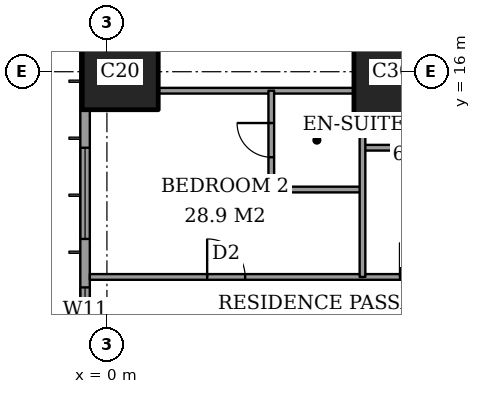
"""IFC4 building model, lengths in metres.
Left out: names, types, materials, properties, quantities, classifications, styles, units other than length and angle.
Written with IfcOpenShell. Run it as: python <this file> out.ifc"""

import sys

from ifc_helpers import new_model, si_unit, direction, frame, frame_2d, origin, origin_2d, place, context, subcontext, project, spatial, rectangle, extrude, element, fill, save


model = new_model("IFC4")
c1 = context("Model", 3, precision=1e-05, world=origin(), true_north=direction((0.0, 1.0)))
c2 = subcontext(c1, "Body", "Model", "MODEL_VIEW")
j1 = project(units=[si_unit("LENGTHUNIT", "METRE"), si_unit("PLANEANGLEUNIT", "RADIAN")], contexts=[c1])
p1 = place(None, origin())
s1 = spatial("IfcSite", under=j1, at=p1, CompositionType="ELEMENT")
p2 = place(p1, origin())
s2 = spatial("IfcBuilding", under=s1, at=p2, CompositionType="ELEMENT")
p3 = place(p2, frame((0.0, 0.0, 164.6)))
s3 = spatial("IfcBuildingStorey", under=s2, at=p3, CompositionType="ELEMENT", Elevation=164.6)
p4 = place(p3, frame((0.35, 16.0, 0.0), z_axis=(0.0, 0.0, 1.0), x_axis=(1.0, 0.0, 0.0)))
e1 = element("IfcColumn", 1, at=p4, inside=s3, PredefinedType="COLUMN", context=c2, shape_type="SweptSolid", body=[
    extrude(rectangle(XDim=2.0, YDim=2.0, at=origin_2d()), origin(), (0.0, 0.0, 1.0), 3.6),
])
p5 = place(p3, frame((8.0, 16.0, 0.0), z_axis=(0.0, 0.0, 1.0), x_axis=(1.0, 0.0, 0.0)))
e2 = element("IfcColumn", 2, at=p5, inside=s3, PredefinedType="COLUMN", context=c2, shape_type="SweptSolid", body=[
    extrude(rectangle(XDim=3.0, YDim=2.4, at=origin_2d()), origin(), (0.0, 0.0, 1.0), 3.6),
])
p6 = place(p3, frame((-0.575, 44.825, 0.0), z_axis=(0.0, 0.0, 1.0), x_axis=(0.0, -1.0, 0.0)))
e3 = element("IfcWall", 3, at=p6, inside=s3, PredefinedType="SOLIDWALL", context=c2, shape_type="SweptSolid", body=[
    extrude(rectangle(XDim=41.65, YDim=0.25, at=frame_2d((20.825, 0.0))), origin(), (0.0, 0.0, 1.0), 3.6),
])
p7 = place(p6, frame((0.775, 0.0, 0.4)))
e4 = element("IfcOpeningElement", 4, at=p7, cuts=e3, PredefinedType="OPENING", context=c2, shape_type="SweptSolid", body=[
    extrude(rectangle(XDim=2.4, YDim=2.2, at=frame_2d((1.2, 1.1))), frame((0.0, 0.135, 0.0), z_axis=(0.0, -1.0, 0.0), x_axis=(1.0, 0.0, 0.0)), (0.0, 0.0, 1.0), 0.27),
])
p8 = place(p6, frame((6.1, 0.0, 0.4)))
e5 = element("IfcOpeningElement", 5, at=p8, cuts=e3, PredefinedType="OPENING", context=c2, shape_type="SweptSolid", body=[
    extrude(rectangle(XDim=1.2, YDim=2.2, at=frame_2d((0.6, 1.1))), frame((0.0, 0.135, 0.0), z_axis=(0.0, -1.0, 0.0), x_axis=(1.0, 0.0, 0.0)), (0.0, 0.0, 1.0), 0.27),
])
p9 = place(p6, frame((8.425, 0.0, 0.4)))
e6 = element("IfcOpeningElement", 6, at=p9, cuts=e3, PredefinedType="OPENING", context=c2, shape_type="SweptSolid", body=[
    extrude(rectangle(XDim=2.4, YDim=2.2, at=frame_2d((1.2, 1.1))), frame((0.0, 0.135, 0.0), z_axis=(0.0, -1.0, 0.0), x_axis=(1.0, 0.0, 0.0)), (0.0, 0.0, 1.0), 0.27),
])
p10 = place(p6, frame((15.625, 0.0, 0.4)))
e7 = element("IfcOpeningElement", 7, at=p10, cuts=e3, PredefinedType="OPENING", context=c2, shape_type="SweptSolid", body=[
    extrude(rectangle(XDim=2.4, YDim=2.2, at=frame_2d((1.2, 1.1))), frame((0.0, 0.135, 0.0), z_axis=(0.0, -1.0, 0.0), x_axis=(1.0, 0.0, 0.0)), (0.0, 0.0, 1.0), 0.27),
])
p11 = place(p6, frame((23.625, 0.0, 0.4)))
e8 = element("IfcOpeningElement", 8, at=p11, cuts=e3, PredefinedType="OPENING", context=c2, shape_type="SweptSolid", body=[
    extrude(rectangle(XDim=2.4, YDim=2.2, at=frame_2d((1.2, 1.1))), frame((0.0, 0.135, 0.0), z_axis=(0.0, -1.0, 0.0), x_axis=(1.0, 0.0, 0.0)), (0.0, 0.0, 1.0), 0.27),
])
p12 = place(p6, frame((30.825, 0.0, 0.4)))
e9 = element("IfcOpeningElement", 9, at=p12, cuts=e3, PredefinedType="OPENING", context=c2, shape_type="SweptSolid", body=[
    extrude(rectangle(XDim=2.4, YDim=2.2, at=frame_2d((1.2, 1.1))), frame((0.0, 0.135, 0.0), z_axis=(0.0, -1.0, 0.0), x_axis=(1.0, 0.0, 0.0)), (0.0, 0.0, 1.0), 0.27),
])
p13 = place(p6, frame((34.5, 0.0, 0.4)))
e10 = element("IfcOpeningElement", 10, at=p13, cuts=e3, PredefinedType="OPENING", context=c2, shape_type="SweptSolid", body=[
    extrude(rectangle(XDim=1.2, YDim=2.2, at=frame_2d((0.6, 1.1))), frame((0.0, 0.135, 0.0), z_axis=(0.0, -1.0, 0.0), x_axis=(1.0, 0.0, 0.0)), (0.0, 0.0, 1.0), 0.27),
])
p14 = place(p6, frame((38.475, 0.0, 0.4)))
e11 = element("IfcOpeningElement", 11, at=p14, cuts=e3, PredefinedType="OPENING", context=c2, shape_type="SweptSolid", body=[
    extrude(rectangle(XDim=2.4, YDim=2.2, at=frame_2d((1.2, 1.1))), frame((0.0, 0.135, 0.0), z_axis=(0.0, -1.0, 0.0), x_axis=(1.0, 0.0, 0.0)), (0.0, 0.0, 1.0), 0.27),
])
p15 = place(p3, frame((-0.45, 10.6, 0.0), z_axis=(0.0, 0.0, 1.0), x_axis=(1.0, 0.0, 0.0)))
e12 = element("IfcWall", 12, at=p15, inside=s3, PredefinedType="PARTITIONING", context=c2, shape_type="SweptSolid", body=[
    extrude(rectangle(XDim=25.011, YDim=0.15, at=frame_2d((12.505, 0.0))), origin(), (0.0, 0.0, 1.0), 3.35),
])
p16 = place(p15, frame((10.65, 0.0, 0.0)))
e13 = element("IfcOpeningElement", 13, at=p16, cuts=e12, PredefinedType="OPENING", context=c2, shape_type="SweptSolid", body=[
    extrude(rectangle(XDim=1.0, YDim=2.1, at=frame_2d((0.5, 1.05))), frame((0.0, 0.085, 0.0), z_axis=(0.0, -1.0, 0.0), x_axis=(1.0, 0.0, 0.0)), (0.0, 0.0, 1.0), 0.17),
])
p17 = place(p15, frame((3.087, 0.0, 0.0)))
e14 = element("IfcOpeningElement", 14, at=p17, cuts=e12, PredefinedType="OPENING", context=c2, shape_type="SweptSolid", body=[
    extrude(rectangle(XDim=1.0, YDim=2.1, at=frame_2d((0.5, 1.05))), frame((0.0, 0.085, 0.0), z_axis=(0.0, -1.0, 0.0), x_axis=(1.0, 0.0, 0.0)), (0.0, 0.0, 1.0), 0.17),
])
p18 = place(p15, frame((8.163, 0.0, 0.0)))
e15 = element("IfcOpeningElement", 15, at=p18, cuts=e12, PredefinedType="OPENING", context=c2, shape_type="SweptSolid", body=[
    extrude(rectangle(XDim=0.9, YDim=2.1, at=frame_2d((0.45, 1.05))), frame((0.0, 0.085, 0.0), z_axis=(0.0, -1.0, 0.0), x_axis=(1.0, 0.0, 0.0)), (0.0, 0.0, 1.0), 0.17),
])
p19 = place(p15, frame((13.35, 0.0, 0.0)))
e16 = element("IfcOpeningElement", 16, at=p19, cuts=e12, PredefinedType="OPENING", context=c2, shape_type="SweptSolid", body=[
    extrude(rectangle(XDim=1.0, YDim=2.1, at=frame_2d((0.5, 1.05))), frame((0.0, 0.085, 0.0), z_axis=(0.0, -1.0, 0.0), x_axis=(1.0, 0.0, 0.0)), (0.0, 0.0, 1.0), 0.17),
])
p20 = place(p15, frame((16.45, 0.0, 0.0)))
e17 = element("IfcOpeningElement", 17, at=p20, cuts=e12, PredefinedType="OPENING", context=c2, shape_type="SweptSolid", body=[
    extrude(rectangle(XDim=1.0, YDim=2.1, at=frame_2d((0.5, 1.05))), frame((0.0, 0.085, 0.0), z_axis=(0.0, -1.0, 0.0), x_axis=(1.0, 0.0, 0.0)), (0.0, 0.0, 1.0), 0.17),
])
p21 = place(p15, frame((21.175, 0.0, 0.0)))
e18 = element("IfcOpeningElement", 18, at=p21, cuts=e12, PredefinedType="OPENING", context=c2, shape_type="SweptSolid", body=[
    extrude(rectangle(XDim=1.0, YDim=2.1, at=frame_2d((0.5, 1.05))), frame((0.0, 0.085, 0.0), z_axis=(0.0, -1.0, 0.0), x_axis=(1.0, 0.0, 0.0)), (0.0, 0.0, 1.0), 0.17),
])
p22 = place(p3, frame((4.325, 12.9, 0.0), z_axis=(0.0, 0.0, 1.0), x_axis=(1.0, 0.0, 0.0)))
e19 = element("IfcWall", 19, at=p22, inside=s3, PredefinedType="PARTITIONING", context=c2, shape_type="SweptSolid", body=[
    extrude(rectangle(XDim=2.4, YDim=0.15, at=frame_2d((1.2, 0.0))), origin(), (0.0, 0.0, 1.0), 3.35),
])
p23 = place(p3, frame((6.725, 14.0, 0.0), z_axis=(0.0, 0.0, 1.0), x_axis=(1.0, 0.0, 0.0)))
e20 = element("IfcWall", 20, at=p23, inside=s3, PredefinedType="PARTITIONING", context=c2, shape_type="SweptSolid", body=[
    extrude(rectangle(XDim=2.875, YDim=0.15, at=frame_2d((1.438, 0.0))), origin(), (0.0, 0.0, 1.0), 3.35),
])
p24 = place(p3, frame((1.35, 15.5, 0.0), z_axis=(0.0, 0.0, 1.0), x_axis=(1.0, 0.0, 0.0)))
e21 = element("IfcWall", 21, at=p24, inside=s3, PredefinedType="PARTITIONING", context=c2, shape_type="SweptSolid", body=[
    extrude(rectangle(XDim=5.15, YDim=0.15, at=frame_2d((2.575, 0.0))), origin(), (0.0, 0.0, 1.0), 3.35),
])
p25 = place(p3, frame((4.325, 12.9, 0.0), z_axis=(0.0, 0.0, 1.0), x_axis=(0.0, 1.0, 0.0)))
e22 = element("IfcWall", 22, at=p25, inside=s3, PredefinedType="PARTITIONING", context=c2, shape_type="SweptSolid", body=[
    extrude(rectangle(XDim=2.6, YDim=0.15, at=frame_2d((1.3, 0.0))), origin(), (0.0, 0.0, 1.0), 3.35),
])
p26 = place(p25, frame((0.85, 0.0, 0.0)))
e23 = element("IfcOpeningElement", 23, at=p26, cuts=e22, PredefinedType="OPENING", context=c2, shape_type="SweptSolid", body=[
    extrude(rectangle(XDim=0.9, YDim=2.1, at=frame_2d((0.45, 1.05))), frame((0.0, 0.085, 0.0), z_axis=(0.0, -1.0, 0.0), x_axis=(1.0, 0.0, 0.0)), (0.0, 0.0, 1.0), 0.17),
])
p27 = place(p3, frame((6.725, 10.6, 0.0), z_axis=(0.0, 0.0, 1.0), x_axis=(0.0, 1.0, 0.0)))
e24 = element("IfcWall", 24, at=p27, inside=s3, PredefinedType="PARTITIONING", context=c2, shape_type="SweptSolid", body=[
    extrude(rectangle(XDim=4.2, YDim=0.15, at=frame_2d((2.1, 0.0))), origin(), (0.0, 0.0, 1.0), 3.35),
])
p28 = place(p12, origin())
e25 = element("IfcWindow", 25, at=p28, inside=s3, PartitioningType="SINGLE_PANEL", PredefinedType="WINDOW", context=c2, shape_type="SweptSolid", body=[
    extrude(rectangle(XDim=2.4, YDim=2.2, at=frame_2d((1.2, 1.1))), frame((0.0, 0.03, 0.0), z_axis=(0.0, -1.0, 0.0), x_axis=(1.0, 0.0, 0.0)), (0.0, 0.0, 1.0), 0.06),
])
fill(e9, e25)
p29 = place(p13, origin())
e26 = element("IfcWindow", 26, at=p29, inside=s3, PartitioningType="SINGLE_PANEL", PredefinedType="WINDOW", context=c2, shape_type="SweptSolid", body=[
    extrude(rectangle(XDim=1.2, YDim=2.2, at=frame_2d((0.6, 1.1))), frame((0.0, 0.03, 0.0), z_axis=(0.0, -1.0, 0.0), x_axis=(1.0, 0.0, 0.0)), (0.0, 0.0, 1.0), 0.06),
])
fill(e10, e26)
p30 = place(p26, origin())
e27 = element("IfcDoor", 27, at=p30, inside=s3, OperationType="SINGLE_SWING_LEFT", PredefinedType="DOOR", context=c2, shape_type="SweptSolid", body=[
    extrude(rectangle(XDim=0.9, YDim=2.1, at=frame_2d((0.45, 1.05))), frame((0.0, 0.025, 0.0), z_axis=(0.0, -1.0, 0.0), x_axis=(1.0, 0.0, 0.0)), (0.0, 0.0, 1.0), 0.05),
])
fill(e23, e27)
p31 = place(p17, origin())
e28 = element("IfcDoor", 28, at=p31, inside=s3, OperationType="SINGLE_SWING_RIGHT", PredefinedType="DOOR", context=c2, shape_type="SweptSolid", body=[
    extrude(rectangle(XDim=1.0, YDim=2.1, at=frame_2d((0.5, 1.05))), frame((0.0, 0.025, 0.0), z_axis=(0.0, -1.0, 0.0), x_axis=(1.0, 0.0, 0.0)), (0.0, 0.0, 1.0), 0.05),
])
fill(e14, e28)
p32 = place(p18, origin())
e29 = element("IfcDoor", 29, at=p32, inside=s3, OperationType="SINGLE_SWING_RIGHT", PredefinedType="DOOR", context=c2, shape_type="SweptSolid", body=[
    extrude(rectangle(XDim=0.9, YDim=2.1, at=frame_2d((0.45, 1.05))), frame((0.0, 0.025, 0.0), z_axis=(0.0, -1.0, 0.0), x_axis=(1.0, 0.0, 0.0)), (0.0, 0.0, 1.0), 0.05),
])
fill(e15, e29)
save(model, sys.argv[1])
